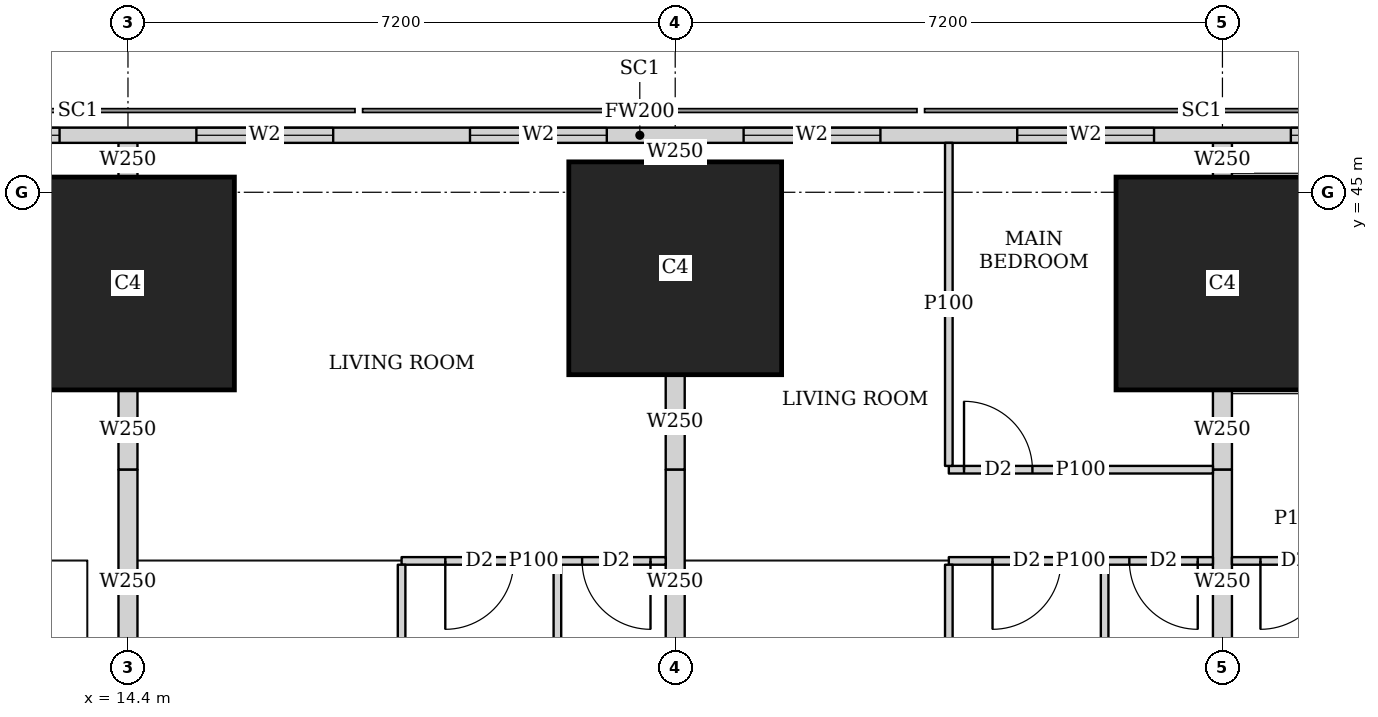
"""IFC4 building model, lengths in metres.
Left out: names, types, materials, properties, quantities, classifications, styles, units other than length and angle.
Written with IfcOpenShell. Run it as: python <this file> out.ifc"""

import sys

from ifc_helpers import new_model, si_unit, direction, frame, frame_2d, origin, origin_2d, place, context, subcontext, project, spatial, rectangle, extrude, element, fill, save


model = new_model("IFC4")
c1 = context("Model", 3, precision=1e-05, world=origin(), true_north=direction((0.0, 1.0)))
c2 = subcontext(c1, "Body", "Model", "MODEL_VIEW")
j1 = project(units=[si_unit("LENGTHUNIT", "METRE"), si_unit("PLANEANGLEUNIT", "RADIAN")], contexts=[c1])
p1 = place(None, origin())
s1 = spatial("IfcSite", under=j1, at=p1, CompositionType="ELEMENT")
p2 = place(p1, origin())
s2 = spatial("IfcBuilding", under=s1, at=p2, CompositionType="ELEMENT")
p3 = place(p2, frame((0.0, 0.0, 42.5)))
s3 = spatial("IfcBuildingStorey", under=s2, at=p3, CompositionType="ELEMENT", Elevation=42.5)
for number, where, z_axis, x_axis in (
    (1, (14.4, 43.8, 0.0), (0.0, 0.0, 1.0), (1.0, 0.0, 0.0)),
    (2, (21.6, 44.0, 0.0), (0.0, 0.0, 1.0), (1.0, 0.0, 0.0)),
    (3, (28.8, 43.8, 0.0), (0.0, 0.0, 1.0), (1.0, 0.0, 0.0)),
):
    element("IfcColumn", number, at=place(p3, frame(where, z_axis=z_axis, x_axis=x_axis)), inside=s3, PredefinedType="COLUMN", context=c2, shape_type="SweptSolid", body=[
        extrude(rectangle(XDim=2.8, YDim=2.8, at=origin_2d()), origin(), (0.0, 0.0, 1.0), 3.75),
    ])
p4 = place(p3, frame((40.106, 45.75, 0.0), z_axis=(0.0, 0.0, 1.0), x_axis=(-1.0, 0.0, 0.0)))
e4 = element("IfcWall", 4, at=p4, inside=s3, PredefinedType="SOLIDWALL", context=c2, shape_type="SweptSolid", body=[
    extrude(rectangle(XDim=37.943, YDim=0.2, at=frame_2d((18.971, 0.0))), origin(), (0.0, 0.0, 1.0), 3.5),
])
p5 = place(p4, frame((8.606, 0.0, 0.9)))
e5 = element("IfcOpeningElement", 5, at=p5, cuts=e4, PredefinedType="OPENING", context=c2, shape_type="SweptSolid", body=[
    extrude(rectangle(XDim=1.8, YDim=1.5, at=frame_2d((0.9, 0.75))), frame((0.0, 0.11, 0.0), z_axis=(0.0, -1.0, 0.0), x_axis=(1.0, 0.0, 0.0)), (0.0, 0.0, 1.0), 0.22),
])
p6 = place(p4, frame((12.206, 0.0, 0.9)))
e6 = element("IfcOpeningElement", 6, at=p6, cuts=e4, PredefinedType="OPENING", context=c2, shape_type="SweptSolid", body=[
    extrude(rectangle(XDim=1.8, YDim=1.5, at=frame_2d((0.9, 0.75))), frame((0.0, 0.11, 0.0), z_axis=(0.0, -1.0, 0.0), x_axis=(1.0, 0.0, 0.0)), (0.0, 0.0, 1.0), 0.22),
])
p7 = place(p4, frame((15.806, 0.0, 0.9)))
e7 = element("IfcOpeningElement", 7, at=p7, cuts=e4, PredefinedType="OPENING", context=c2, shape_type="SweptSolid", body=[
    extrude(rectangle(XDim=1.8, YDim=1.5, at=frame_2d((0.9, 0.75))), frame((0.0, 0.11, 0.0), z_axis=(0.0, -1.0, 0.0), x_axis=(1.0, 0.0, 0.0)), (0.0, 0.0, 1.0), 0.22),
])
p8 = place(p4, frame((19.406, 0.0, 0.9)))
e8 = element("IfcOpeningElement", 8, at=p8, cuts=e4, PredefinedType="OPENING", context=c2, shape_type="SweptSolid", body=[
    extrude(rectangle(XDim=1.8, YDim=1.5, at=frame_2d((0.9, 0.75))), frame((0.0, 0.11, 0.0), z_axis=(0.0, -1.0, 0.0), x_axis=(1.0, 0.0, 0.0)), (0.0, 0.0, 1.0), 0.22),
])
p9 = place(p4, frame((23.006, 0.0, 0.9)))
e9 = element("IfcOpeningElement", 9, at=p9, cuts=e4, PredefinedType="OPENING", context=c2, shape_type="SweptSolid", body=[
    extrude(rectangle(XDim=1.8, YDim=1.5, at=frame_2d((0.9, 0.75))), frame((0.0, 0.11, 0.0), z_axis=(0.0, -1.0, 0.0), x_axis=(1.0, 0.0, 0.0)), (0.0, 0.0, 1.0), 0.22),
])
p10 = place(p4, frame((26.606, 0.0, 0.9)))
e10 = element("IfcOpeningElement", 10, at=p10, cuts=e4, PredefinedType="OPENING", context=c2, shape_type="SweptSolid", body=[
    extrude(rectangle(XDim=1.8, YDim=1.5, at=frame_2d((0.9, 0.75))), frame((0.0, 0.11, 0.0), z_axis=(0.0, -1.0, 0.0), x_axis=(1.0, 0.0, 0.0)), (0.0, 0.0, 1.0), 0.22),
])
p11 = place(p3, frame((18.0, 40.15, 0.0), z_axis=(0.0, 0.0, 1.0), x_axis=(1.0, 0.0, 0.0)))
e11 = element("IfcWall", 11, at=p11, inside=s3, PredefinedType="PARTITIONING", context=c2, shape_type="SweptSolid", body=[
    extrude(rectangle(XDim=3.475, YDim=0.1, at=frame_2d((1.738, 0.0))), origin(), (0.0, 0.0, 1.0), 3.5),
])
p12 = place(p11, frame((0.575, 0.0, 0.0)))
e12 = element("IfcOpeningElement", 12, at=p12, cuts=e11, PredefinedType="OPENING", context=c2, shape_type="SweptSolid", body=[
    extrude(rectangle(XDim=0.9, YDim=2.1, at=frame_2d((0.45, 1.05))), frame((0.0, 0.06, 0.0), z_axis=(0.0, -1.0, 0.0), x_axis=(1.0, 0.0, 0.0)), (0.0, 0.0, 1.0), 0.12),
])
p13 = place(p11, frame((2.375, 0.0, 0.0)))
e13 = element("IfcOpeningElement", 13, at=p13, cuts=e11, PredefinedType="OPENING", context=c2, shape_type="SweptSolid", body=[
    extrude(rectangle(XDim=0.9, YDim=2.1, at=frame_2d((0.45, 1.05))), frame((0.0, 0.06, 0.0), z_axis=(0.0, -1.0, 0.0), x_axis=(1.0, 0.0, 0.0)), (0.0, 0.0, 1.0), 0.12),
])
for number, where, z_axis, x_axis in (
    (14, (18.0, 36.575, 0.0), (0.0, 0.0, 1.0), (0.0, 1.0, 0.0)),
    (15, (20.05, 36.575, 0.0), (0.0, 0.0, 1.0), (0.0, 1.0, 0.0)),
):
    element("IfcWall", number, at=place(p3, frame(where, z_axis=z_axis, x_axis=x_axis)), inside=s3, PredefinedType="PARTITIONING", context=c2, shape_type="SweptSolid", body=[
        extrude(rectangle(XDim=3.525, YDim=0.1, at=frame_2d((1.763, 0.0))), origin(), (0.0, 0.0, 1.0), 3.5),
    ])
p14 = place(p3, frame((14.4, 41.35, 0.0), z_axis=(0.0, 0.0, 1.0), x_axis=(0.0, 1.0, 0.0)))
e16 = element("IfcWall", 16, at=p14, inside=s3, PredefinedType="SOLIDWALL", context=c2, shape_type="SweptSolid", body=[
    extrude(rectangle(XDim=1.049, YDim=0.25, at=frame_2d((0.524, 0.0))), origin(), (0.0, 0.0, 1.0), 3.5),
])
p15 = place(p3, frame((14.4, 45.201, 0.0), z_axis=(0.0, 0.0, 1.0), x_axis=(0.0, 1.0, 0.0)))
e17 = element("IfcWall", 17, at=p15, inside=s3, PredefinedType="SOLIDWALL", context=c2, shape_type="SweptSolid", body=[
    extrude(rectangle(XDim=0.449, YDim=0.25, at=frame_2d((0.225, 0.0))), origin(), (0.0, 0.0, 1.0), 3.5),
])
p16 = place(p3, frame((14.4, 38.401, 0.0), z_axis=(0.0, 0.0, 1.0), x_axis=(0.0, 1.0, 0.0)))
e18 = element("IfcWall", 18, at=p16, inside=s3, PredefinedType="SOLIDWALL", context=c2, shape_type="SweptSolid", body=[
    extrude(rectangle(XDim=2.949, YDim=0.25, at=frame_2d((1.475, 0.0))), origin(), (0.0, 0.0, 1.0), 3.5),
])
p17 = place(p3, frame((25.2, 41.35, 0.0), z_axis=(0.0, 0.0, 1.0), x_axis=(1.0, 0.0, 0.0)))
e19 = element("IfcWall", 19, at=p17, inside=s3, PredefinedType="PARTITIONING", context=c2, shape_type="SweptSolid", body=[
    extrude(rectangle(XDim=3.475, YDim=0.1, at=frame_2d((1.738, 0.0))), origin(), (0.0, 0.0, 1.0), 3.5),
])
p18 = place(p17, frame((0.2, 0.0, 0.0)))
e20 = element("IfcOpeningElement", 20, at=p18, cuts=e19, PredefinedType="OPENING", context=c2, shape_type="SweptSolid", body=[
    extrude(rectangle(XDim=0.9, YDim=2.1, at=frame_2d((0.45, 1.05))), frame((0.0, 0.06, 0.0), z_axis=(0.0, -1.0, 0.0), x_axis=(1.0, 0.0, 0.0)), (0.0, 0.0, 1.0), 0.12),
])
p19 = place(p3, frame((25.2, 40.15, 0.0), z_axis=(0.0, 0.0, 1.0), x_axis=(1.0, 0.0, 0.0)))
e21 = element("IfcWall", 21, at=p19, inside=s3, PredefinedType="PARTITIONING", context=c2, shape_type="SweptSolid", body=[
    extrude(rectangle(XDim=3.475, YDim=0.1, at=frame_2d((1.738, 0.0))), origin(), (0.0, 0.0, 1.0), 3.5),
])
p20 = place(p19, frame((0.575, 0.0, 0.0)))
e22 = element("IfcOpeningElement", 22, at=p20, cuts=e21, PredefinedType="OPENING", context=c2, shape_type="SweptSolid", body=[
    extrude(rectangle(XDim=0.9, YDim=2.1, at=frame_2d((0.45, 1.05))), frame((0.0, 0.06, 0.0), z_axis=(0.0, -1.0, 0.0), x_axis=(1.0, 0.0, 0.0)), (0.0, 0.0, 1.0), 0.12),
])
p21 = place(p19, frame((2.375, 0.0, 0.0)))
e23 = element("IfcOpeningElement", 23, at=p21, cuts=e21, PredefinedType="OPENING", context=c2, shape_type="SweptSolid", body=[
    extrude(rectangle(XDim=0.9, YDim=2.1, at=frame_2d((0.45, 1.05))), frame((0.0, 0.06, 0.0), z_axis=(0.0, -1.0, 0.0), x_axis=(1.0, 0.0, 0.0)), (0.0, 0.0, 1.0), 0.12),
])
p22 = place(p3, frame((25.2, 41.4, 0.0), z_axis=(0.0, 0.0, 1.0), x_axis=(0.0, 1.0, 0.0)))
e24 = element("IfcWall", 24, at=p22, inside=s3, PredefinedType="PARTITIONING", context=c2, shape_type="SweptSolid", body=[
    extrude(rectangle(XDim=4.25, YDim=0.1, at=frame_2d((2.125, 0.0))), origin(), (0.0, 0.0, 1.0), 2.05),
])
for number, where, z_axis, x_axis in (
    (25, (25.2, 36.575, 0.0), (0.0, 0.0, 1.0), (0.0, 1.0, 0.0)),
    (26, (27.25, 36.575, 0.0), (0.0, 0.0, 1.0), (0.0, 1.0, 0.0)),
):
    element("IfcWall", number, at=place(p3, frame(where, z_axis=z_axis, x_axis=x_axis)), inside=s3, PredefinedType="PARTITIONING", context=c2, shape_type="SweptSolid", body=[
        extrude(rectangle(XDim=3.525, YDim=0.1, at=frame_2d((1.763, 0.0))), origin(), (0.0, 0.0, 1.0), 3.5),
    ])
p23 = place(p3, frame((21.6, 41.35, 0.0), z_axis=(0.0, 0.0, 1.0), x_axis=(0.0, 1.0, 0.0)))
e27 = element("IfcWall", 27, at=p23, inside=s3, PredefinedType="SOLIDWALL", context=c2, shape_type="SweptSolid", body=[
    extrude(rectangle(XDim=1.249, YDim=0.25, at=frame_2d((0.625, 0.0))), origin(), (0.0, 0.0, 1.0), 3.5),
])
p24 = place(p3, frame((21.6, 45.401, 0.0), z_axis=(0.0, 0.0, 1.0), x_axis=(0.0, 1.0, 0.0)))
e28 = element("IfcWall", 28, at=p24, inside=s3, PredefinedType="SOLIDWALL", context=c2, shape_type="SweptSolid", body=[
    extrude(rectangle(XDim=0.249, YDim=0.25, at=frame_2d((0.125, 0.0))), origin(), (0.0, 0.0, 1.0), 3.5),
])
p25 = place(p3, frame((21.6, 38.401, 0.0), z_axis=(0.0, 0.0, 1.0), x_axis=(0.0, 1.0, 0.0)))
e29 = element("IfcWall", 29, at=p25, inside=s3, PredefinedType="SOLIDWALL", context=c2, shape_type="SweptSolid", body=[
    extrude(rectangle(XDim=2.949, YDim=0.25, at=frame_2d((1.475, 0.0))), origin(), (0.0, 0.0, 1.0), 3.5),
])
p26 = place(p3, frame((28.925, 40.15, 0.0), z_axis=(0.0, 0.0, 1.0), x_axis=(1.0, 0.0, 0.0)))
e30 = element("IfcWall", 30, at=p26, inside=s3, PredefinedType="PARTITIONING", context=c2, shape_type="SweptSolid", body=[
    extrude(rectangle(XDim=1.765, YDim=0.1, at=frame_2d((0.882, 0.0))), origin(), (0.0, 0.0, 1.0), 3.5),
])
p27 = place(p26, frame((0.375, 0.0, 0.0)))
e31 = element("IfcOpeningElement", 31, at=p27, cuts=e30, PredefinedType="OPENING", context=c2, shape_type="SweptSolid", body=[
    extrude(rectangle(XDim=0.9, YDim=2.1, at=frame_2d((0.45, 1.05))), frame((0.0, 0.06, 0.0), z_axis=(0.0, -1.0, 0.0), x_axis=(1.0, 0.0, 0.0)), (0.0, 0.0, 1.0), 0.12),
])
p28 = place(p3, frame((28.8, 41.35, 0.0), z_axis=(0.0, 0.0, 1.0), x_axis=(0.0, 1.0, 0.0)))
e32 = element("IfcWall", 32, at=p28, inside=s3, PredefinedType="SOLIDWALL", context=c2, shape_type="SweptSolid", body=[
    extrude(rectangle(XDim=1.049, YDim=0.25, at=frame_2d((0.524, 0.0))), origin(), (0.0, 0.0, 1.0), 3.5),
])
p29 = place(p3, frame((28.8, 45.201, 0.0), z_axis=(0.0, 0.0, 1.0), x_axis=(0.0, 1.0, 0.0)))
e33 = element("IfcWall", 33, at=p29, inside=s3, PredefinedType="SOLIDWALL", context=c2, shape_type="SweptSolid", body=[
    extrude(rectangle(XDim=0.449, YDim=0.25, at=frame_2d((0.225, 0.0))), origin(), (0.0, 0.0, 1.0), 3.5),
])
p30 = place(p3, frame((28.8, 38.401, 0.0), z_axis=(0.0, 0.0, 1.0), x_axis=(0.0, 1.0, 0.0)))
e34 = element("IfcWall", 34, at=p30, inside=s3, PredefinedType="SOLIDWALL", context=c2, shape_type="SweptSolid", body=[
    extrude(rectangle(XDim=2.949, YDim=0.25, at=frame_2d((1.475, 0.0))), origin(), (0.0, 0.0, 1.0), 3.5),
])
p31 = place(p5, origin())
e35 = element("IfcWindow", 35, at=p31, inside=s3, PartitioningType="SINGLE_PANEL", PredefinedType="WINDOW", context=c2, shape_type="SweptSolid", body=[
    extrude(rectangle(XDim=1.8, YDim=1.5, at=frame_2d((0.9, 0.75))), frame((0.0, 0.03, 0.0), z_axis=(0.0, -1.0, 0.0), x_axis=(1.0, 0.0, 0.0)), (0.0, 0.0, 1.0), 0.06),
])
fill(e5, e35)
p32 = place(p6, origin())
e36 = element("IfcWindow", 36, at=p32, inside=s3, PartitioningType="SINGLE_PANEL", PredefinedType="WINDOW", context=c2, shape_type="SweptSolid", body=[
    extrude(rectangle(XDim=1.8, YDim=1.5, at=frame_2d((0.9, 0.75))), frame((0.0, 0.03, 0.0), z_axis=(0.0, -1.0, 0.0), x_axis=(1.0, 0.0, 0.0)), (0.0, 0.0, 1.0), 0.06),
])
fill(e6, e36)
p33 = place(p7, origin())
e37 = element("IfcWindow", 37, at=p33, inside=s3, PartitioningType="SINGLE_PANEL", PredefinedType="WINDOW", context=c2, shape_type="SweptSolid", body=[
    extrude(rectangle(XDim=1.8, YDim=1.5, at=frame_2d((0.9, 0.75))), frame((0.0, 0.03, 0.0), z_axis=(0.0, -1.0, 0.0), x_axis=(1.0, 0.0, 0.0)), (0.0, 0.0, 1.0), 0.06),
])
fill(e7, e37)
p34 = place(p8, origin())
e38 = element("IfcWindow", 38, at=p34, inside=s3, PartitioningType="SINGLE_PANEL", PredefinedType="WINDOW", context=c2, shape_type="SweptSolid", body=[
    extrude(rectangle(XDim=1.8, YDim=1.5, at=frame_2d((0.9, 0.75))), frame((0.0, 0.03, 0.0), z_axis=(0.0, -1.0, 0.0), x_axis=(1.0, 0.0, 0.0)), (0.0, 0.0, 1.0), 0.06),
])
fill(e8, e38)
p35 = place(p9, origin())
e39 = element("IfcWindow", 39, at=p35, inside=s3, PartitioningType="SINGLE_PANEL", PredefinedType="WINDOW", context=c2, shape_type="SweptSolid", body=[
    extrude(rectangle(XDim=1.8, YDim=1.5, at=frame_2d((0.9, 0.75))), frame((0.0, 0.03, 0.0), z_axis=(0.0, -1.0, 0.0), x_axis=(1.0, 0.0, 0.0)), (0.0, 0.0, 1.0), 0.06),
])
fill(e9, e39)
p36 = place(p10, origin())
e40 = element("IfcWindow", 40, at=p36, inside=s3, PartitioningType="SINGLE_PANEL", PredefinedType="WINDOW", context=c2, shape_type="SweptSolid", body=[
    extrude(rectangle(XDim=1.8, YDim=1.5, at=frame_2d((0.9, 0.75))), frame((0.0, 0.03, 0.0), z_axis=(0.0, -1.0, 0.0), x_axis=(1.0, 0.0, 0.0)), (0.0, 0.0, 1.0), 0.06),
])
fill(e10, e40)
p37 = place(p12, origin())
e41 = element("IfcDoor", 41, at=p37, inside=s3, OperationType="SINGLE_SWING_RIGHT", PredefinedType="DOOR", context=c2, shape_type="SweptSolid", body=[
    extrude(rectangle(XDim=0.9, YDim=2.1, at=frame_2d((0.45, 1.05))), frame((0.0, 0.025, 0.0), z_axis=(0.0, -1.0, 0.0), x_axis=(1.0, 0.0, 0.0)), (0.0, 0.0, 1.0), 0.05),
])
fill(e12, e41)
p38 = place(p13, origin())
e42 = element("IfcDoor", 42, at=p38, inside=s3, OperationType="SINGLE_SWING_LEFT", PredefinedType="DOOR", context=c2, shape_type="SweptSolid", body=[
    extrude(rectangle(XDim=0.9, YDim=2.1, at=frame_2d((0.45, 1.05))), frame((0.0, 0.025, 0.0), z_axis=(0.0, -1.0, 0.0), x_axis=(1.0, 0.0, 0.0)), (0.0, 0.0, 1.0), 0.05),
])
fill(e13, e42)
p39 = place(p18, origin())
e43 = element("IfcDoor", 43, at=p39, inside=s3, OperationType="SINGLE_SWING_LEFT", PredefinedType="DOOR", context=c2, shape_type="SweptSolid", body=[
    extrude(rectangle(XDim=0.9, YDim=2.1, at=frame_2d((0.45, 1.05))), frame((0.0, 0.025, 0.0), z_axis=(0.0, -1.0, 0.0), x_axis=(1.0, 0.0, 0.0)), (0.0, 0.0, 1.0), 0.05),
])
fill(e20, e43)
p40 = place(p20, origin())
e44 = element("IfcDoor", 44, at=p40, inside=s3, OperationType="SINGLE_SWING_RIGHT", PredefinedType="DOOR", context=c2, shape_type="SweptSolid", body=[
    extrude(rectangle(XDim=0.9, YDim=2.1, at=frame_2d((0.45, 1.05))), frame((0.0, 0.025, 0.0), z_axis=(0.0, -1.0, 0.0), x_axis=(1.0, 0.0, 0.0)), (0.0, 0.0, 1.0), 0.05),
])
fill(e22, e44)
p41 = place(p21, origin())
e45 = element("IfcDoor", 45, at=p41, inside=s3, OperationType="SINGLE_SWING_LEFT", PredefinedType="DOOR", context=c2, shape_type="SweptSolid", body=[
    extrude(rectangle(XDim=0.9, YDim=2.1, at=frame_2d((0.45, 1.05))), frame((0.0, 0.025, 0.0), z_axis=(0.0, -1.0, 0.0), x_axis=(1.0, 0.0, 0.0)), (0.0, 0.0, 1.0), 0.05),
])
fill(e23, e45)
p42 = place(p27, origin())
e46 = element("IfcDoor", 46, at=p42, inside=s3, OperationType="SINGLE_SWING_RIGHT", PredefinedType="DOOR", context=c2, shape_type="SweptSolid", body=[
    extrude(rectangle(XDim=0.9, YDim=2.1, at=frame_2d((0.45, 1.05))), frame((0.0, 0.025, 0.0), z_axis=(0.0, -1.0, 0.0), x_axis=(1.0, 0.0, 0.0)), (0.0, 0.0, 1.0), 0.05),
])
fill(e31, e46)
save(model, sys.argv[1])
